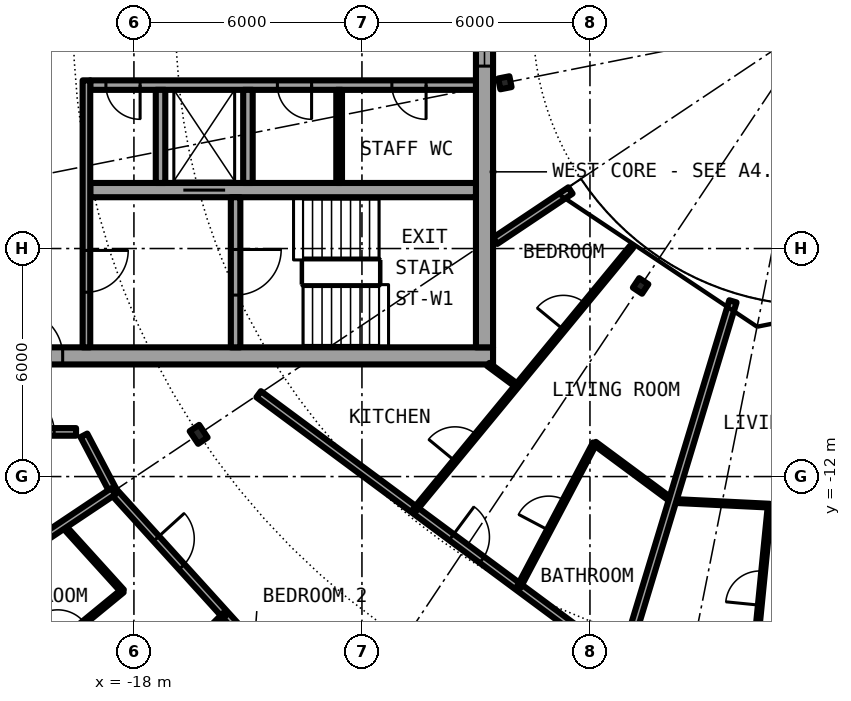
"""IFC4 building model, lengths in metres.
Left out: names, types, materials, properties, quantities, classifications, styles, units other than length and angle.
Written with IfcOpenShell. Run it as: python <this file> out.ifc"""

import sys

from ifc_helpers import new_model, si_unit, direction, frame, frame_2d, origin, origin_2d, place, context, subcontext, project, spatial, rectangle, i_section, extrude, element, fill, save


model = new_model("IFC4")
c1 = context("Model", 3, precision=1e-05, world=origin(), true_north=direction((0.0, 1.0)))
c2 = subcontext(c1, "Body", "Model", "MODEL_VIEW")
j1 = project(units=[si_unit("LENGTHUNIT", "METRE"), si_unit("PLANEANGLEUNIT", "RADIAN")], contexts=[c1])
p1 = place(None, origin())
s1 = spatial("IfcSite", under=j1, at=p1, CompositionType="ELEMENT")
p2 = place(p1, origin())
s2 = spatial("IfcBuilding", under=s1, at=p2, CompositionType="ELEMENT")
p3 = place(p2, frame((0.0, 0.0, 218.8)))
s3 = spatial("IfcBuildingStorey", under=s2, at=p3, CompositionType="ELEMENT", Elevation=218.8)
p4 = place(p3, frame((-16.297, -10.889, 0.0), z_axis=(0.0, 0.0, 1.0), x_axis=(-0.831469612303, -0.55557023302, 0.0)))
e1 = element("IfcColumn", 1, at=p4, inside=s3, PredefinedType="COLUMN", context=c2, shape_type="SweptSolid", body=[
    extrude(i_section(OverallWidth=0.3, OverallDepth=0.4, WebThickness=0.013, FlangeThickness=0.024, FilletRadius=0.027, at=origin_2d()), origin(), (0.0, 0.0, 1.0), 3.05),
])
for number, where, z_axis, x_axis in (
    (2, (-8.239, -1.639, 0.0), (0.0, 0.0, 1.0), (-0.981, -0.195, 0.0)),
    (3, (-4.667, -6.984, 0.0), (0.0, 0.0, 1.0), (-0.556, -0.831, 0.0)),
):
    element("IfcColumn", number, at=place(p3, frame(where, z_axis=z_axis, x_axis=x_axis)), inside=s3, PredefinedType="COLUMN", context=c2, shape_type="SweptSolid", body=[
        extrude(i_section(OverallWidth=0.3, OverallDepth=0.29, WebThickness=0.009, FlangeThickness=0.014, FilletRadius=0.027, at=origin_2d()), origin(), (0.0, 0.0, 1.0), 3.05),
    ])
p5 = place(p3, frame((-22.699, -15.167, 0.0), z_axis=(0.0, 0.0, 1.0), x_axis=(0.634382322723, -0.773019449054, 0.0)))
e4 = element("IfcWall", 4, at=p5, inside=s3, PredefinedType="SOLIDWALL", context=c2, shape_type="SweptSolid", body=[
    extrude(rectangle(XDim=5.352, YDim=0.25, at=frame_2d((2.676, 0.0))), origin(), (0.0, 0.0, 1.0), 2.65),
])
p6 = place(p5, frame((0.841, 0.0, 0.0)))
e5 = element("IfcOpeningElement", 5, at=p6, cuts=e4, PredefinedType="OPENING", context=c2, shape_type="SweptSolid", body=[
    extrude(rectangle(XDim=1.0, YDim=2.2, at=frame_2d((0.5, 1.1))), frame((0.0, 0.135, 0.0), z_axis=(0.0, -1.0, 0.0), x_axis=(1.0, 0.0, 0.0)), (0.0, 0.0, 1.0), 0.27),
])
p7 = place(p5, frame((3.111, 0.0, 0.3)))
e6 = element("IfcOpeningElement", 6, at=p7, cuts=e4, PredefinedType="OPENING", context=c2, shape_type="SweptSolid", body=[
    extrude(rectangle(XDim=1.8, YDim=2.1, at=frame_2d((0.9, 1.05))), frame((0.0, 0.135, 0.0), z_axis=(0.0, -1.0, 0.0), x_axis=(1.0, 0.0, 0.0)), (0.0, 0.0, 1.0), 0.27),
])
p8 = place(p3, frame((-22.05, -8.825, 0.0), z_axis=(0.0, 0.0, 1.0), x_axis=(1.0, 0.0, 0.0)))
e7 = element("IfcWall", 7, at=p8, inside=s3, PredefinedType="SHEAR", context=c2, shape_type="SweptSolid", body=[
    extrude(rectangle(XDim=13.5, YDim=0.45, at=frame_2d((6.75, 0.0))), origin(), (0.0, 0.0, 1.0), 3.05),
])
p9 = place(p8, frame((0.975, 0.0, 0.0)))
e8 = element("IfcOpeningElement", 8, at=p9, cuts=e7, PredefinedType="OPENING", context=c2, shape_type="SweptSolid", body=[
    extrude(rectangle(XDim=1.2, YDim=2.3, at=frame_2d((0.6, 1.15))), frame((0.0, 0.235, 0.0), z_axis=(0.0, -1.0, 0.0), x_axis=(1.0, 0.0, 0.0)), (0.0, 0.0, 1.0), 0.47),
])
p10 = place(p3, frame((-8.775, 8.6, 0.0), z_axis=(0.0, 0.0, 1.0), x_axis=(0.0, -1.0, 0.0)))
e9 = element("IfcWall", 9, at=p10, inside=s3, PredefinedType="SHEAR", context=c2, shape_type="SweptSolid", body=[
    extrude(rectangle(XDim=17.2, YDim=0.45, at=frame_2d((8.6, 0.0))), origin(), (0.0, 0.0, 1.0), 3.05),
])
p11 = place(p10, frame((7.4, 0.0, 0.1)))
e10 = element("IfcOpeningElement", 10, at=p11, cuts=e9, PredefinedType="OPENING", context=c2, shape_type="SweptSolid", body=[
    extrude(rectangle(XDim=2.4, YDim=2.2, at=frame_2d((1.2, 1.1))), frame((0.0, 0.235, 0.0), z_axis=(0.0, -1.0, 0.0), x_axis=(1.0, 0.0, 0.0)), (0.0, 0.0, 1.0), 0.47),
])
p12 = place(p3, frame((-9.0, -1.7, 0.0), z_axis=(0.0, 0.0, 1.0), x_axis=(-1.0, 0.0, 0.0)))
e11 = element("IfcWall", 11, at=p12, inside=s3, PredefinedType="SHEAR", context=c2, shape_type="SweptSolid", body=[
    extrude(rectangle(XDim=10.15, YDim=0.25, at=frame_2d((5.075, 0.0))), origin(), (0.0, 0.0, 1.0), 3.05),
])
p13 = place(p12, frame((1.312, 0.0, 0.0)))
e12 = element("IfcOpeningElement", 12, at=p13, cuts=e11, PredefinedType="OPENING", context=c2, shape_type="SweptSolid", body=[
    extrude(rectangle(XDim=0.9, YDim=2.3, at=frame_2d((0.45, 1.15))), frame((0.0, 0.135, 0.0), z_axis=(0.0, -1.0, 0.0), x_axis=(1.0, 0.0, 0.0)), (0.0, 0.0, 1.0), 0.27),
])
p14 = place(p12, frame((4.325, 0.0, 0.0)))
e13 = element("IfcOpeningElement", 13, at=p14, cuts=e11, PredefinedType="OPENING", context=c2, shape_type="SweptSolid", body=[
    extrude(rectangle(XDim=0.9, YDim=2.3, at=frame_2d((0.45, 1.15))), frame((0.0, 0.135, 0.0), z_axis=(0.0, -1.0, 0.0), x_axis=(1.0, 0.0, 0.0)), (0.0, 0.0, 1.0), 0.27),
])
p15 = place(p12, frame((8.837, 0.0, 0.0)))
e14 = element("IfcOpeningElement", 14, at=p15, cuts=e11, PredefinedType="OPENING", context=c2, shape_type="SweptSolid", body=[
    extrude(rectangle(XDim=0.9, YDim=2.3, at=frame_2d((0.45, 1.15))), frame((0.0, 0.135, 0.0), z_axis=(0.0, -1.0, 0.0), x_axis=(1.0, 0.0, 0.0)), (0.0, 0.0, 1.0), 0.27),
])
p16 = place(p3, frame((-9.0, -4.462, 0.0), z_axis=(0.0, 0.0, 1.0), x_axis=(-1.0, 0.0, 0.0)))
e15 = element("IfcWall", 15, at=p16, inside=s3, PredefinedType="SHEAR", context=c2, shape_type="SweptSolid", body=[
    extrude(rectangle(XDim=10.15, YDim=0.375, at=frame_2d((5.075, 0.0))), origin(), (0.0, 0.0, 1.0), 3.05),
])
p17 = place(p16, frame((6.6, 0.0, 0.0)))
e16 = element("IfcOpeningElement", 16, at=p17, cuts=e15, PredefinedType="OPENING", context=c2, shape_type="SweptSolid", body=[
    extrude(rectangle(XDim=1.1, YDim=2.3, at=frame_2d((0.55, 1.15))), frame((0.0, 0.198, 0.0), z_axis=(0.0, -1.0, 0.0), x_axis=(1.0, 0.0, 0.0)), (0.0, 0.0, 1.0), 0.395),
])
p18 = place(p3, frame((-15.325, -4.65, 0.0), z_axis=(0.0, 0.0, 1.0), x_axis=(0.0, -1.0, 0.0)))
e17 = element("IfcWall", 17, at=p18, inside=s3, PredefinedType="SHEAR", context=c2, shape_type="SweptSolid", body=[
    extrude(rectangle(XDim=3.95, YDim=0.25, at=frame_2d((1.975, 0.0))), origin(), (0.0, 0.0, 1.0), 3.05),
])
p19 = place(p18, frame((1.375, 0.0, 0.0)))
e18 = element("IfcOpeningElement", 18, at=p19, cuts=e17, PredefinedType="OPENING", context=c2, shape_type="SweptSolid", body=[
    extrude(rectangle(XDim=1.2, YDim=2.3, at=frame_2d((0.6, 1.15))), frame((0.0, 0.135, 0.0), z_axis=(0.0, -1.0, 0.0), x_axis=(1.0, 0.0, 0.0)), (0.0, 0.0, 1.0), 0.27),
])
for number, where, z_axis, x_axis in (
    (19, (-15.0, -1.825, 0.0), (0.0, 0.0, 1.0), (0.0, -1.0, 0.0)),
    (20, (-17.3, -1.825, 0.0), (0.0, 0.0, 1.0), (0.0, -1.0, 0.0)),
):
    element("IfcWall", number, at=place(p3, frame(where, z_axis=z_axis, x_axis=x_axis)), inside=s3, PredefinedType="SOLIDWALL", context=c2, shape_type="SweptSolid", body=[
        extrude(rectangle(XDim=2.45, YDim=0.25, at=frame_2d((1.225, 0.0))), origin(), (0.0, 0.0, 1.0), 2.65),
    ])
p20 = place(p3, frame((-19.25, -1.575, 0.0), z_axis=(0.0, 0.0, 1.0), x_axis=(0.0, -1.0, 0.0)))
e21 = element("IfcWall", 21, at=p20, inside=s3, PredefinedType="SOLIDWALL", context=c2, shape_type="SweptSolid", body=[
    extrude(rectangle(XDim=7.025, YDim=0.2, at=frame_2d((3.513, 0.0))), origin(), (0.0, 0.0, 1.0), 2.65),
])
p21 = place(p20, frame((4.475, 0.0, 0.0)))
e22 = element("IfcOpeningElement", 22, at=p21, cuts=e21, PredefinedType="OPENING", context=c2, shape_type="SweptSolid", body=[
    extrude(rectangle(XDim=1.1, YDim=2.3, at=frame_2d((0.55, 1.15))), frame((0.0, 0.11, 0.0), z_axis=(0.0, -1.0, 0.0), x_axis=(1.0, 0.0, 0.0)), (0.0, 0.0, 1.0), 0.22),
])
p22 = place(p3, frame((-12.6, -1.825, 0.0), z_axis=(0.0, 0.0, 1.0), x_axis=(0.0, -1.0, 0.0)))
e23 = element("IfcWall", 23, at=p22, inside=s3, PredefinedType="PARTITIONING", context=c2, shape_type="SweptSolid", body=[
    extrude(rectangle(XDim=2.45, YDim=0.15, at=frame_2d((1.225, 0.0))), origin(), (0.0, 0.0, 1.0), 2.65),
])
p23 = place(p3, frame((-19.872, -13.278, 0.0), z_axis=(0.0, 0.0, 1.0), x_axis=(0.671637685376, -0.740879760544, 0.0)))
e24 = element("IfcWall", 24, at=p23, inside=s3, PredefinedType="PARTITIONING", context=c2, shape_type="SweptSolid", body=[
    extrude(rectangle(XDim=2.338, YDim=0.1, at=frame_2d((1.169, 0.0))), origin(), (0.0, 0.0, 1.0), 2.65),
])
p24 = place(p3, frame((-19.317, -10.915, 0.0), z_axis=(0.0, 0.0, 1.0), x_axis=(0.465359652486, -0.885121683068, 0.0)))
e25 = element("IfcWall", 25, at=p24, inside=s3, PredefinedType="PARTITIONING", context=c2, shape_type="SweptSolid", body=[
    extrude(rectangle(XDim=1.665, YDim=0.2, at=frame_2d((0.833, 0.0))), origin(), (0.0, 0.0, 1.0), 2.65),
])
p25 = place(p3, frame((-18.542, -12.389, 0.0), z_axis=(0.0, 0.0, 1.0), x_axis=(0.671561669125, -0.740948665268, 0.0)))
e26 = element("IfcWall", 26, at=p25, inside=s3, PredefinedType="PARTITIONING", context=c2, shape_type="SweptSolid", body=[
    extrude(rectangle(XDim=6.544, YDim=0.2, at=frame_2d((3.272, 0.0))), origin(), (0.0, 0.0, 1.0), 2.65),
])
p26 = place(p25, frame((1.682, 0.0, 0.0)))
e27 = element("IfcOpeningElement", 27, at=p26, cuts=e26, PredefinedType="OPENING", context=c2, shape_type="SweptSolid", body=[
    extrude(rectangle(XDim=1.0, YDim=2.3, at=frame_2d((0.5, 1.15))), frame((0.0, 0.11, 0.0), z_axis=(0.0, -1.0, 0.0), x_axis=(1.0, 0.0, 0.0)), (0.0, 0.0, 1.0), 0.22),
])
p27 = place(p3, frame((-14.718, -9.833, 0.0), z_axis=(0.0, 0.0, 1.0), x_axis=(0.803240181354, -0.595655278712, 0.0)))
e28 = element("IfcWall", 28, at=p27, inside=s3, PredefinedType="PARTITIONING", context=c2, shape_type="SweptSolid", body=[
    extrude(rectangle(XDim=11.928, YDim=0.2, at=frame_2d((5.964, 0.0))), origin(), (0.0, 0.0, 1.0), 2.65),
])
p28 = place(p27, frame((6.316, 0.0, 0.0)))
e29 = element("IfcOpeningElement", 29, at=p28, cuts=e28, PredefinedType="OPENING", context=c2, shape_type="SweptSolid", body=[
    extrude(rectangle(XDim=1.0, YDim=2.3, at=frame_2d((0.5, 1.15))), frame((0.0, 0.11, 0.0), z_axis=(0.0, -1.0, 0.0), x_axis=(1.0, 0.0, 0.0)), (0.0, 0.0, 1.0), 0.22),
])
p29 = place(p3, frame((-3.834, -12.64, 0.0), z_axis=(0.0, 0.0, 1.0), x_axis=(0.998790464653, -0.049169174464, 0.0)))
e30 = element("IfcWall", 30, at=p29, inside=s3, PredefinedType="PARTITIONING", context=c2, shape_type="SweptSolid", body=[
    extrude(rectangle(XDim=2.567, YDim=0.1, at=frame_2d((1.284, 0.0))), origin(), (0.0, 0.0, 1.0), 2.65),
])
p30 = place(p3, frame((-8.676, -9.05, 0.0), z_axis=(0.0, 0.0, 1.0), x_axis=(0.803437844371, -0.595388637977, 0.0)))
e31 = element("IfcWall", 31, at=p30, inside=s3, PredefinedType="PARTITIONING", context=c2, shape_type="SweptSolid", body=[
    extrude(rectangle(XDim=0.942, YDim=0.1, at=frame_2d((0.471, 0.0))), origin(), (0.0, 0.0, 1.0), 2.65),
])
p31 = place(p3, frame((-5.874, -11.127, 0.0), z_axis=(0.0, 0.0, 1.0), x_axis=(0.803533389313, -0.595259684725, 0.0)))
e32 = element("IfcWall", 32, at=p31, inside=s3, PredefinedType="PARTITIONING", context=c2, shape_type="SweptSolid", body=[
    extrude(rectangle(XDim=2.544, YDim=0.1, at=frame_2d((1.272, 0.0))), origin(), (0.0, 0.0, 1.0), 2.65),
])
p32 = place(p3, frame((-21.675, -10.825, 0.0), z_axis=(0.0, 0.0, 1.0), x_axis=(1.0, 0.0, 0.0)))
e33 = element("IfcWall", 33, at=p32, inside=s3, PredefinedType="PARTITIONING", context=c2, shape_type="SweptSolid", body=[
    extrude(rectangle(XDim=2.152, YDim=0.2, at=frame_2d((1.076, 0.0))), origin(), (0.0, 0.0, 1.0), 2.65),
])
p33 = place(p32, frame((0.576, 0.0, 0.0)))
e34 = element("IfcOpeningElement", 34, at=p33, cuts=e33, PredefinedType="OPENING", context=c2, shape_type="SweptSolid", body=[
    extrude(rectangle(XDim=1.0, YDim=2.3, at=frame_2d((0.5, 1.15))), frame((0.0, 0.11, 0.0), z_axis=(0.0, -1.0, 0.0), x_axis=(1.0, 0.0, 0.0)), (0.0, 0.0, 1.0), 0.22),
])
p34 = place(p3, frame((-6.513, -4.472, 0.0), z_axis=(0.0, 0.0, 1.0), x_axis=(-0.831403409976, -0.555669299026, 0.0)))
e35 = element("IfcWall", 35, at=p34, inside=s3, PredefinedType="PARTITIONING", context=c2, shape_type="SweptSolid", body=[
    extrude(rectangle(XDim=2.383, YDim=0.2, at=frame_2d((1.191, 0.0))), origin(), (0.0, 0.0, 1.0), 2.65),
])
p35 = place(p3, frame((-22.595, -15.098, 0.0), z_axis=(0.0, 0.0, 1.0), x_axis=(0.831387096605, 0.55569370664, 0.0)))
e36 = element("IfcWall", 36, at=p35, inside=s3, PredefinedType="PARTITIONING", context=c2, shape_type="SweptSolid", body=[
    extrude(rectangle(XDim=4.875, YDim=0.2, at=frame_2d((2.438, 0.0))), origin(), (0.0, 0.0, 1.0), 2.65),
])
p36 = place(p3, frame((-21.012, -17.233, 0.0), z_axis=(0.0, 0.0, 1.0), x_axis=(0.773165322764, 0.634204528267, 0.0)))
e37 = element("IfcWall", 37, at=p36, inside=s3, PredefinedType="PARTITIONING", context=c2, shape_type="SweptSolid", body=[
    extrude(rectangle(XDim=3.505, YDim=0.1, at=frame_2d((1.752, 0.0))), origin(), (0.0, 0.0, 1.0), 2.65),
])
p37 = place(p36, frame((1.303, 0.0, 0.0)))
e38 = element("IfcOpeningElement", 38, at=p37, cuts=e37, PredefinedType="OPENING", context=c2, shape_type="SweptSolid", body=[
    extrude(rectangle(XDim=0.9, YDim=2.3, at=frame_2d((0.45, 1.15))), frame((0.0, 0.06, 0.0), z_axis=(0.0, -1.0, 0.0), x_axis=(1.0, 0.0, 0.0)), (0.0, 0.0, 1.0), 0.12),
])
p38 = place(p3, frame((-16.732, -16.743, 0.0), z_axis=(0.0, 0.0, 1.0), x_axis=(0.70679853939, 0.707414888673, 0.0)))
e39 = element("IfcWall", 39, at=p38, inside=s3, PredefinedType="PARTITIONING", context=c2, shape_type="SweptSolid", body=[
    extrude(rectangle(XDim=1.584, YDim=0.1, at=frame_2d((0.792, 0.0))), origin(), (0.0, 0.0, 1.0), 2.65),
])
p39 = place(p3, frame((-10.612, -12.878, 0.0), z_axis=(0.0, 0.0, 1.0), x_axis=(0.636115614725, 0.771593756262, 0.0)))
e40 = element("IfcWall", 40, at=p39, inside=s3, PredefinedType="PARTITIONING", context=c2, shape_type="SweptSolid", body=[
    extrude(rectangle(XDim=8.967, YDim=0.1, at=frame_2d((4.483, 0.0))), origin(), (0.0, 0.0, 1.0), 2.65),
])
p40 = place(p39, frame((1.667, 0.0, 0.0)))
e41 = element("IfcOpeningElement", 41, at=p40, cuts=e40, PredefinedType="OPENING", context=c2, shape_type="SweptSolid", body=[
    extrude(rectangle(XDim=0.9, YDim=2.3, at=frame_2d((0.45, 1.15))), frame((0.0, 0.06, 0.0), z_axis=(0.0, -1.0, 0.0), x_axis=(1.0, 0.0, 0.0)), (0.0, 0.0, 1.0), 0.12),
])
p41 = place(p39, frame((6.151, 0.0, 0.0)))
e42 = element("IfcOpeningElement", 42, at=p41, cuts=e40, PredefinedType="OPENING", context=c2, shape_type="SweptSolid", body=[
    extrude(rectangle(XDim=0.9, YDim=2.3, at=frame_2d((0.45, 1.15))), frame((0.0, 0.06, 0.0), z_axis=(0.0, -1.0, 0.0), x_axis=(1.0, 0.0, 0.0)), (0.0, 0.0, 1.0), 0.12),
])
p42 = place(p3, frame((-7.874, -14.909, 0.0), z_axis=(0.0, 0.0, 1.0), x_axis=(0.467030118529, 0.884241408432, 0.0)))
e43 = element("IfcWall", 43, at=p42, inside=s3, PredefinedType="PARTITIONING", context=c2, shape_type="SweptSolid", body=[
    extrude(rectangle(XDim=4.278, YDim=0.1, at=frame_2d((2.139, 0.0))), origin(), (0.0, 0.0, 1.0), 2.65),
])
p43 = place(p42, frame((1.69, 0.0, 0.0)))
e44 = element("IfcOpeningElement", 44, at=p43, cuts=e43, PredefinedType="OPENING", context=c2, shape_type="SweptSolid", body=[
    extrude(rectangle(XDim=0.9, YDim=2.3, at=frame_2d((0.45, 1.15))), frame((0.0, 0.06, 0.0), z_axis=(0.0, -1.0, 0.0), x_axis=(1.0, 0.0, 0.0)), (0.0, 0.0, 1.0), 0.12),
])
p44 = place(p3, frame((-5.134, -16.939, 0.0), z_axis=(0.0, 0.0, 1.0), x_axis=(0.290194791136, 0.956967597778, 0.0)))
e45 = element("IfcWall", 45, at=p44, inside=s3, PredefinedType="PARTITIONING", context=c2, shape_type="SweptSolid", body=[
    extrude(rectangle(XDim=9.979, YDim=0.2, at=frame_2d((4.99, 0.0))), origin(), (0.0, 0.0, 1.0), 2.65),
])
p45 = place(p3, frame((-1.702, -17.107, 0.0), z_axis=(0.0, 0.0, 1.0), x_axis=(0.099004993851, 0.9950869365, 0.0)))
e46 = element("IfcWall", 46, at=p45, inside=s3, PredefinedType="PARTITIONING", context=c2, shape_type="SweptSolid", body=[
    extrude(rectangle(XDim=4.362, YDim=0.1, at=frame_2d((2.181, 0.0))), origin(), (0.0, 0.0, 1.0), 2.65),
])
p46 = place(p45, frame((1.731, 0.0, 0.0)))
e47 = element("IfcOpeningElement", 47, at=p46, cuts=e46, PredefinedType="OPENING", context=c2, shape_type="SweptSolid", body=[
    extrude(rectangle(XDim=0.9, YDim=2.3, at=frame_2d((0.45, 1.15))), frame((0.0, 0.06, 0.0), z_axis=(0.0, -1.0, 0.0), x_axis=(1.0, 0.0, 0.0)), (0.0, 0.0, 1.0), 0.12),
])
p47 = place(p17, origin())
e48 = element("IfcDoor", 48, at=p47, inside=s3, OperationType="DOUBLE_DOOR_SLIDING", PredefinedType="DOOR", context=c2, shape_type="SweptSolid", body=[
    extrude(rectangle(XDim=1.1, YDim=2.3, at=frame_2d((0.55, 1.15))), frame((0.0, 0.025, 0.0), z_axis=(0.0, -1.0, 0.0), x_axis=(1.0, 0.0, 0.0)), (0.0, 0.0, 1.0), 0.05),
])
fill(e16, e48)
p48 = place(p13, origin())
e49 = element("IfcDoor", 49, at=p48, inside=s3, OperationType="SINGLE_SWING_RIGHT", PredefinedType="DOOR", context=c2, shape_type="SweptSolid", body=[
    extrude(rectangle(XDim=0.9, YDim=2.3, at=frame_2d((0.45, 1.15))), frame((0.0, 0.025, 0.0), z_axis=(0.0, -1.0, 0.0), x_axis=(1.0, 0.0, 0.0)), (0.0, 0.0, 1.0), 0.05),
])
fill(e12, e49)
p49 = place(p14, origin())
e50 = element("IfcDoor", 50, at=p49, inside=s3, OperationType="SINGLE_SWING_RIGHT", PredefinedType="DOOR", context=c2, shape_type="SweptSolid", body=[
    extrude(rectangle(XDim=0.9, YDim=2.3, at=frame_2d((0.45, 1.15))), frame((0.0, 0.025, 0.0), z_axis=(0.0, -1.0, 0.0), x_axis=(1.0, 0.0, 0.0)), (0.0, 0.0, 1.0), 0.05),
])
fill(e13, e50)
p50 = place(p15, origin())
e51 = element("IfcDoor", 51, at=p50, inside=s3, OperationType="SINGLE_SWING_LEFT", PredefinedType="DOOR", context=c2, shape_type="SweptSolid", body=[
    extrude(rectangle(XDim=0.9, YDim=2.3, at=frame_2d((0.45, 1.15))), frame((0.0, 0.025, 0.0), z_axis=(0.0, -1.0, 0.0), x_axis=(1.0, 0.0, 0.0)), (0.0, 0.0, 1.0), 0.05),
])
fill(e14, e51)
p51 = place(p19, origin())
e52 = element("IfcDoor", 52, at=p51, inside=s3, OperationType="SINGLE_SWING_LEFT", PredefinedType="DOOR", context=c2, shape_type="SweptSolid", body=[
    extrude(rectangle(XDim=1.2, YDim=2.3, at=frame_2d((0.6, 1.15))), frame((0.0, 0.025, 0.0), z_axis=(0.0, -1.0, 0.0), x_axis=(1.0, 0.0, 0.0)), (0.0, 0.0, 1.0), 0.05),
])
fill(e18, e52)
p52 = place(p21, origin())
e53 = element("IfcDoor", 53, at=p52, inside=s3, OperationType="SINGLE_SWING_LEFT", PredefinedType="DOOR", context=c2, shape_type="SweptSolid", body=[
    extrude(rectangle(XDim=1.1, YDim=2.3, at=frame_2d((0.55, 1.15))), frame((0.0, 0.025, 0.0), z_axis=(0.0, -1.0, 0.0), x_axis=(1.0, 0.0, 0.0)), (0.0, 0.0, 1.0), 0.05),
])
fill(e22, e53)
p53 = place(p9, origin())
e54 = element("IfcDoor", 54, at=p53, inside=s3, OperationType="SINGLE_SWING_RIGHT", PredefinedType="DOOR", context=c2, shape_type="SweptSolid", body=[
    extrude(rectangle(XDim=1.2, YDim=2.3, at=frame_2d((0.6, 1.15))), frame((0.0, 0.025, 0.0), z_axis=(0.0, -1.0, 0.0), x_axis=(1.0, 0.0, 0.0)), (0.0, 0.0, 1.0), 0.05),
])
fill(e8, e54)
p54 = place(p11, origin())
e55 = element("IfcWindow", 55, at=p54, inside=s3, PartitioningType="SINGLE_PANEL", PredefinedType="WINDOW", context=c2, shape_type="SweptSolid", body=[
    extrude(rectangle(XDim=2.4, YDim=2.2, at=frame_2d((1.2, 1.1))), frame((0.0, 0.03, 0.0), z_axis=(0.0, -1.0, 0.0), x_axis=(1.0, 0.0, 0.0)), (0.0, 0.0, 1.0), 0.06),
])
fill(e10, e55)
p55 = place(p26, origin())
e56 = element("IfcDoor", 56, at=p55, inside=s3, OperationType="SINGLE_SWING_LEFT", PredefinedType="DOOR", context=c2, shape_type="SweptSolid", body=[
    extrude(rectangle(XDim=1.0, YDim=2.3, at=frame_2d((0.5, 1.15))), frame((0.0, 0.025, 0.0), z_axis=(0.0, -1.0, 0.0), x_axis=(1.0, 0.0, 0.0)), (0.0, 0.0, 1.0), 0.05),
])
fill(e27, e56)
p56 = place(p28, origin())
e57 = element("IfcDoor", 57, at=p56, inside=s3, OperationType="SINGLE_SWING_RIGHT", PredefinedType="DOOR", context=c2, shape_type="SweptSolid", body=[
    extrude(rectangle(XDim=1.0, YDim=2.3, at=frame_2d((0.5, 1.15))), frame((0.0, 0.025, 0.0), z_axis=(0.0, -1.0, 0.0), x_axis=(1.0, 0.0, 0.0)), (0.0, 0.0, 1.0), 0.05),
])
fill(e29, e57)
p57 = place(p43, origin())
e58 = element("IfcDoor", 58, at=p57, inside=s3, OperationType="SINGLE_SWING_RIGHT", PredefinedType="DOOR", context=c2, shape_type="SweptSolid", body=[
    extrude(rectangle(XDim=0.9, YDim=2.3, at=frame_2d((0.45, 1.15))), frame((0.0, 0.025, 0.0), z_axis=(0.0, -1.0, 0.0), x_axis=(1.0, 0.0, 0.0)), (0.0, 0.0, 1.0), 0.05),
])
fill(e44, e58)
p58 = place(p40, origin())
e59 = element("IfcDoor", 59, at=p58, inside=s3, OperationType="SINGLE_SWING_LEFT", PredefinedType="DOOR", context=c2, shape_type="SweptSolid", body=[
    extrude(rectangle(XDim=0.9, YDim=2.3, at=frame_2d((0.45, 1.15))), frame((0.0, 0.025, 0.0), z_axis=(0.0, -1.0, 0.0), x_axis=(1.0, 0.0, 0.0)), (0.0, 0.0, 1.0), 0.05),
])
fill(e41, e59)
p59 = place(p41, origin())
e60 = element("IfcDoor", 60, at=p59, inside=s3, OperationType="SINGLE_SWING_RIGHT", PredefinedType="DOOR", context=c2, shape_type="SweptSolid", body=[
    extrude(rectangle(XDim=0.9, YDim=2.3, at=frame_2d((0.45, 1.15))), frame((0.0, 0.025, 0.0), z_axis=(0.0, -1.0, 0.0), x_axis=(1.0, 0.0, 0.0)), (0.0, 0.0, 1.0), 0.05),
])
fill(e42, e60)
p60 = place(p46, origin())
e61 = element("IfcDoor", 61, at=p60, inside=s3, OperationType="SINGLE_SWING_RIGHT", PredefinedType="DOOR", context=c2, shape_type="SweptSolid", body=[
    extrude(rectangle(XDim=0.9, YDim=2.3, at=frame_2d((0.45, 1.15))), frame((0.0, 0.025, 0.0), z_axis=(0.0, -1.0, 0.0), x_axis=(1.0, 0.0, 0.0)), (0.0, 0.0, 1.0), 0.05),
])
fill(e47, e61)
p61 = place(p33, origin())
e62 = element("IfcDoor", 62, at=p61, inside=s3, OperationType="SINGLE_SWING_LEFT", PredefinedType="DOOR", context=c2, shape_type="SweptSolid", body=[
    extrude(rectangle(XDim=1.0, YDim=2.3, at=frame_2d((0.5, 1.15))), frame((0.0, 0.025, 0.0), z_axis=(0.0, -1.0, 0.0), x_axis=(1.0, 0.0, 0.0)), (0.0, 0.0, 1.0), 0.05),
])
fill(e34, e62)
save(model, sys.argv[1])
